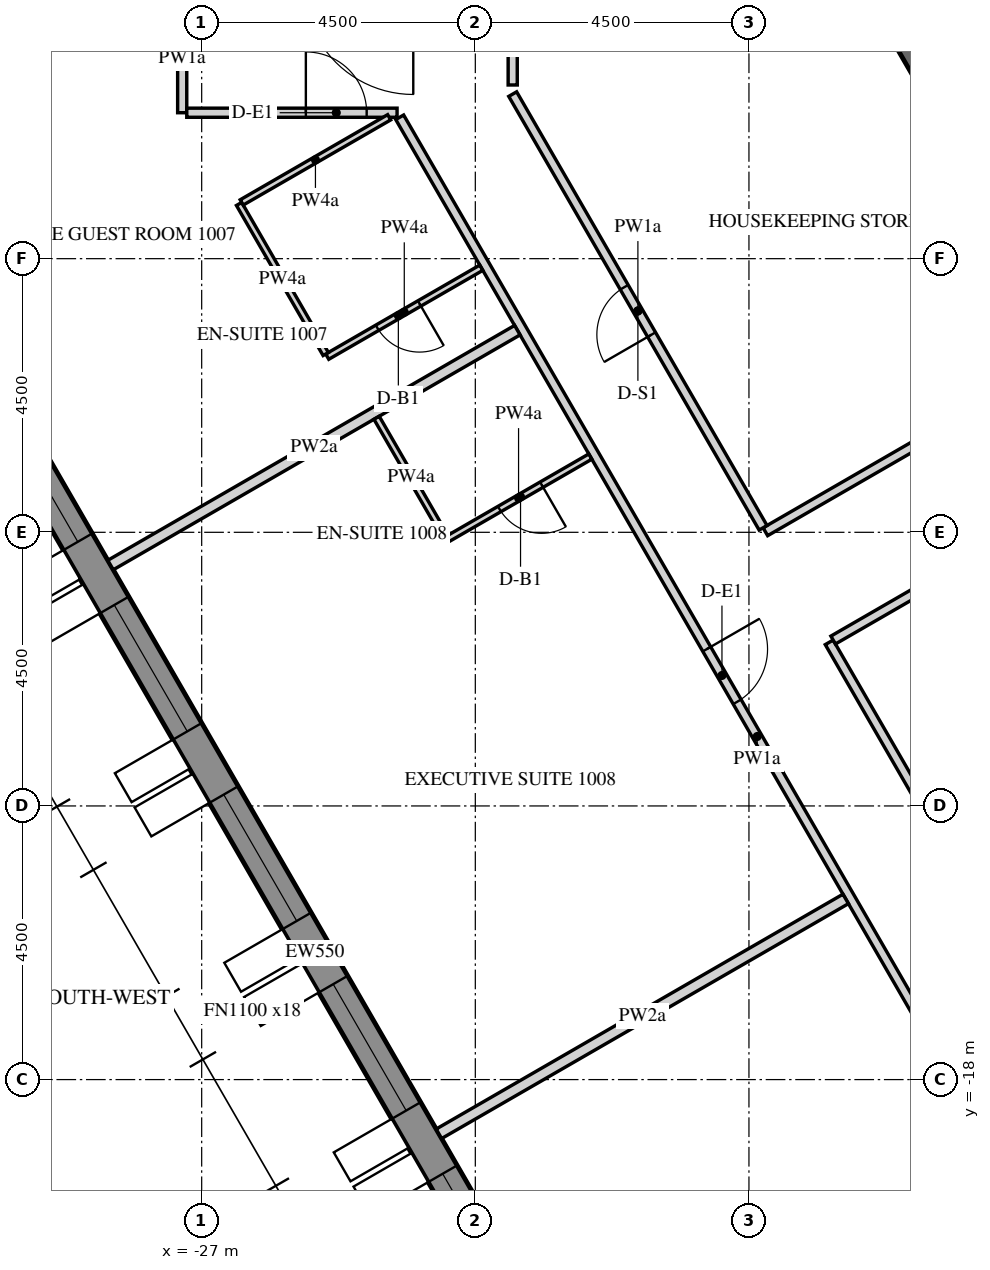
"""IFC4 building model, lengths in metres.
Left out: names, types, materials, properties, quantities, classifications, styles, units other than length and angle.
Written with IfcOpenShell. Run it as: python <this file> out.ifc"""

import sys

from ifc_helpers import new_model, si_unit, direction, frame, frame_2d, origin, place, context, subcontext, project, spatial, polyline, rectangle, outline, extrude, element, fill, save


model = new_model("IFC4")
c1 = context("Model", 3, precision=1e-05, world=origin(), true_north=direction((0.0, 1.0)))
c2 = subcontext(c1, "Body", "Model", "MODEL_VIEW")
j1 = project(units=[si_unit("LENGTHUNIT", "METRE"), si_unit("PLANEANGLEUNIT", "RADIAN")], contexts=[c1])
p1 = place(None, origin())
s1 = spatial("IfcSite", under=j1, at=p1, CompositionType="ELEMENT")
p2 = place(p1, origin())
s2 = spatial("IfcBuilding", under=s1, at=p2, CompositionType="ELEMENT")
p3 = place(p2, frame((0.0, 0.0, 135.0)))
s3 = spatial("IfcBuildingStorey", under=s2, at=p3, CompositionType="ELEMENT", Elevation=135.0)
p4 = place(p3, frame((-32.655, -2.89, -0.15), z_axis=(0.0, 0.0, 1.0), x_axis=(0.499997711317, -0.866026725152, 0.0)))
e1 = element("IfcWall", 1, at=p4, inside=s3, PredefinedType="SOLIDWALL", context=c2, shape_type="SweptSolid", body=[
    extrude(outline(polyline([(-0.022, -0.275), (30.097, -0.275), (30.045, 0.275), (0.022, 0.275), (-0.022, -0.275)])), origin(), (0.0, 0.0, 1.0), 3.9),
])
p5 = place(p4, frame((1.236, 0.0, 1.05)))
e2 = element("IfcOpeningElement", 2, at=p5, cuts=e1, PredefinedType="OPENING", context=c2, shape_type="SweptSolid", body=[
    extrude(rectangle(XDim=2.4, YDim=2.4, at=frame_2d((1.2, 1.2))), frame((0.0, 0.285, 0.0), z_axis=(0.0, -1.0, 0.0), x_axis=(1.0, 0.0, 0.0)), (0.0, 0.0, 1.0), 0.57),
])
p6 = place(p4, frame((4.835, 0.0, 1.05)))
e3 = element("IfcOpeningElement", 3, at=p6, cuts=e1, PredefinedType="OPENING", context=c2, shape_type="SweptSolid", body=[
    extrude(rectangle(XDim=2.4, YDim=2.4, at=frame_2d((1.2, 1.2))), frame((0.0, 0.285, 0.0), z_axis=(0.0, -1.0, 0.0), x_axis=(1.0, 0.0, 0.0)), (0.0, 0.0, 1.0), 0.57),
])
p7 = place(p4, frame((8.436, 0.0, 1.05)))
e4 = element("IfcOpeningElement", 4, at=p7, cuts=e1, PredefinedType="OPENING", context=c2, shape_type="SweptSolid", body=[
    extrude(rectangle(XDim=2.4, YDim=2.4, at=frame_2d((1.2, 1.2))), frame((0.0, 0.285, 0.0), z_axis=(0.0, -1.0, 0.0), x_axis=(1.0, 0.0, 0.0)), (0.0, 0.0, 1.0), 0.57),
])
p8 = place(p4, frame((12.035, 0.0, 1.05)))
e5 = element("IfcOpeningElement", 5, at=p8, cuts=e1, PredefinedType="OPENING", context=c2, shape_type="SweptSolid", body=[
    extrude(rectangle(XDim=2.4, YDim=2.4, at=frame_2d((1.2, 1.2))), frame((0.0, 0.285, 0.0), z_axis=(0.0, -1.0, 0.0), x_axis=(1.0, 0.0, 0.0)), (0.0, 0.0, 1.0), 0.57),
])
p9 = place(p4, frame((15.635, 0.0, 1.05)))
e6 = element("IfcOpeningElement", 6, at=p9, cuts=e1, PredefinedType="OPENING", context=c2, shape_type="SweptSolid", body=[
    extrude(rectangle(XDim=2.4, YDim=2.4, at=frame_2d((1.2, 1.2))), frame((0.0, 0.285, 0.0), z_axis=(0.0, -1.0, 0.0), x_axis=(1.0, 0.0, 0.0)), (0.0, 0.0, 1.0), 0.57),
])
p10 = place(p4, frame((19.236, 0.0, 1.05)))
e7 = element("IfcOpeningElement", 7, at=p10, cuts=e1, PredefinedType="OPENING", context=c2, shape_type="SweptSolid", body=[
    extrude(rectangle(XDim=2.4, YDim=2.4, at=frame_2d((1.2, 1.2))), frame((0.0, 0.285, 0.0), z_axis=(0.0, -1.0, 0.0), x_axis=(1.0, 0.0, 0.0)), (0.0, 0.0, 1.0), 0.57),
])
p11 = place(p4, frame((22.835, 0.0, 1.05)))
e8 = element("IfcOpeningElement", 8, at=p11, cuts=e1, PredefinedType="OPENING", context=c2, shape_type="SweptSolid", body=[
    extrude(rectangle(XDim=2.4, YDim=2.4, at=frame_2d((1.2, 1.2))), frame((0.0, 0.285, 0.0), z_axis=(0.0, -1.0, 0.0), x_axis=(1.0, 0.0, 0.0)), (0.0, 0.0, 1.0), 0.57),
])
p12 = place(p4, frame((26.436, 0.0, 1.05)))
e9 = element("IfcOpeningElement", 9, at=p12, cuts=e1, PredefinedType="OPENING", context=c2, shape_type="SweptSolid", body=[
    extrude(rectangle(XDim=2.4, YDim=2.4, at=frame_2d((1.2, 1.2))), frame((0.0, 0.285, 0.0), z_axis=(0.0, -1.0, 0.0), x_axis=(1.0, 0.0, 0.0)), (0.0, 0.0, 1.0), 0.57),
])
p13 = place(p3, frame((-15.819, 0.0, -0.15), z_axis=(0.0, 0.0, 1.0), x_axis=(0.499999880136, -0.866025472988, 0.0)))
e10 = element("IfcWall", 10, at=p13, inside=s3, PredefinedType="SHEAR", context=c2, shape_type="SweptSolid", body=[
    extrude(outline(polyline([(-0.173, -0.3), (15.993, -0.3), (15.646, 0.3), (0.173, 0.3), (-0.173, -0.3)])), origin(), (0.0, 0.0, 1.0), 3.9),
])
p14 = place(p13, frame((6.981, 0.0, 0.15)))
e11 = element("IfcOpeningElement", 11, at=p14, cuts=e10, PredefinedType="OPENING", context=c2, shape_type="SweptSolid", body=[
    extrude(rectangle(XDim=1.8, YDim=2.4, at=frame_2d((0.9, 1.2))), frame((0.0, 0.31, 0.0), z_axis=(0.0, -1.0, 0.0), x_axis=(1.0, 0.0, 0.0)), (0.0, 0.0, 1.0), 0.62),
])
p15 = place(p3, frame((-27.32, -0.3, 0.0), z_axis=(0.0, 0.0, 1.0), x_axis=(0.0, -1.0, 0.0)))
e12 = element("IfcWall", 12, at=p15, inside=s3, PredefinedType="PARTITIONING", context=c2, shape_type="SweptSolid", body=[
    extrude(rectangle(XDim=1.8, YDim=0.15, at=frame_2d((0.9, 0.0))), origin(), (0.0, 0.0, 1.0), 2.838),
])
p16 = place(p3, frame((-27.245, -2.1, 0.0), z_axis=(0.0, 0.0, 1.0), x_axis=(1.0, 0.0, 0.0)))
e13 = element("IfcWall", 13, at=p16, inside=s3, PredefinedType="PARTITIONING", context=c2, shape_type="SweptSolid", body=[
    extrude(rectangle(XDim=3.458, YDim=0.15, at=frame_2d((1.729, 0.0))), origin(), (0.0, 0.0, 1.0), 2.838),
])
p17 = place(p16, frame((1.958, 0.0, 0.0)))
e14 = element("IfcOpeningElement", 14, at=p17, cuts=e13, PredefinedType="OPENING", context=c2, shape_type="SweptSolid", body=[
    extrude(rectangle(XDim=1.0, YDim=2.1, at=frame_2d((0.5, 1.05))), frame((0.0, 0.085, 0.0), z_axis=(0.0, -1.0, 0.0), x_axis=(1.0, 0.0, 0.0)), (0.0, 0.0, 1.0), 0.17),
])
p18 = place(p3, frame((-23.743, -2.175, 0.0), z_axis=(0.0, 0.0, 1.0), x_axis=(0.499992353047, -0.86602981871, 0.0)))
e15 = element("IfcWall", 15, at=p18, inside=s3, PredefinedType="PARTITIONING", context=c2, shape_type="SweptSolid", body=[
    extrude(rectangle(XDim=23.516, YDim=0.15, at=frame_2d((11.758, 0.0))), origin(), (0.0, 0.0, 1.0), 2.838),
])
p19 = place(p18, frame((10.099, 0.0, 0.0)))
e16 = element("IfcOpeningElement", 16, at=p19, cuts=e15, PredefinedType="OPENING", context=c2, shape_type="SweptSolid", body=[
    extrude(rectangle(XDim=1.0, YDim=2.1, at=frame_2d((0.5, 1.05))), frame((0.0, 0.085, 0.0), z_axis=(0.0, -1.0, 0.0), x_axis=(1.0, 0.0, 0.0)), (0.0, 0.0, 1.0), 0.17),
])
p20 = place(p18, frame((17.358, 0.0, 0.0)))
e17 = element("IfcOpeningElement", 17, at=p20, cuts=e15, PredefinedType="OPENING", context=c2, shape_type="SweptSolid", body=[
    extrude(rectangle(XDim=1.0, YDim=2.1, at=frame_2d((0.5, 1.05))), frame((0.0, 0.085, 0.0), z_axis=(0.0, -1.0, 0.0), x_axis=(1.0, 0.0, 0.0)), (0.0, 0.0, 1.0), 0.17),
])
p21 = place(p3, frame((-12.664, -6.066, 0.0), z_axis=(0.0, 0.0, 1.0), x_axis=(-0.866018092707, -0.500012662943, 0.0)))
e18 = element("IfcWall", 18, at=p21, inside=s3, PredefinedType="PARTITIONING", context=c2, shape_type="SweptSolid", body=[
    extrude(rectangle(XDim=5.85, YDim=0.15, at=frame_2d((2.925, 0.0))), origin(), (0.0, 0.0, 1.0), 2.838),
])
p22 = place(p3, frame((-17.768, -8.926, 0.0), z_axis=(0.0, 0.0, 1.0), x_axis=(-0.499997033681, 0.866027116383, 0.0)))
e19 = element("IfcWall", 19, at=p22, inside=s3, PredefinedType="PARTITIONING", context=c2, shape_type="SweptSolid", body=[
    extrude(rectangle(XDim=8.235, YDim=0.15, at=frame_2d((4.118, 0.0))), origin(), (0.0, 0.0, 1.0), 2.838),
])
p23 = place(p22, frame((3.668, 0.0, 0.0)))
e20 = element("IfcOpeningElement", 20, at=p23, cuts=e19, PredefinedType="OPENING", context=c2, shape_type="SweptSolid", body=[
    extrude(rectangle(XDim=0.9, YDim=2.1, at=frame_2d((0.45, 1.05))), frame((0.0, 0.085, 0.0), z_axis=(0.0, -1.0, 0.0), x_axis=(1.0, 0.0, 0.0)), (0.0, 0.0, 1.0), 0.17),
])
p24 = place(p3, frame((-21.885, -1.644, 0.0), z_axis=(0.0, 0.0, 1.0), x_axis=(0.0, 1.0, 0.0)))
e21 = element("IfcWall", 21, at=p24, inside=s3, PredefinedType="PARTITIONING", context=c2, shape_type="SweptSolid", body=[
    extrude(rectangle(XDim=1.344, YDim=0.15, at=frame_2d((0.672, 0.0))), origin(), (0.0, 0.0, 1.0), 2.838),
])
p25 = place(p3, frame((-11.031, -20.595, 0.0), z_axis=(0.0, 0.0, 1.0), x_axis=(-0.499987422378, 0.866032665356, 0.0)))
e22 = element("IfcWall", 22, at=p25, inside=s3, PredefinedType="PARTITIONING", context=c2, shape_type="SweptSolid", body=[
    extrude(rectangle(XDim=11.299, YDim=0.15, at=frame_2d((5.649, 0.0))), origin(), (0.0, 0.0, 1.0), 2.838),
])
p26 = place(p25, frame((5.199, 0.0, 0.0)))
e23 = element("IfcOpeningElement", 23, at=p26, cuts=e22, PredefinedType="OPENING", context=c2, shape_type="SweptSolid", body=[
    extrude(rectangle(XDim=0.9, YDim=2.1, at=frame_2d((0.45, 1.05))), frame((0.0, 0.085, 0.0), z_axis=(0.0, -1.0, 0.0), x_axis=(1.0, 0.0, 0.0)), (0.0, 0.0, 1.0), 0.17),
])
p27 = place(p3, frame((-16.615, -10.772, 0.0), z_axis=(0.0, 0.0, 1.0), x_axis=(0.866025774745, 0.499999357477, 0.0)))
e24 = element("IfcWall", 24, at=p27, inside=s3, PredefinedType="PARTITIONING", context=c2, shape_type="SweptSolid", body=[
    extrude(rectangle(XDim=5.775, YDim=0.15, at=frame_2d((2.887, 0.0))), origin(), (0.0, 0.0, 1.0), 2.838),
])
p28 = place(p3, frame((-22.402, -4.649, 0.0), z_axis=(0.0, 0.0, 1.0), x_axis=(-0.865989585315, -0.500062034277, 0.0)))
e25 = element("IfcWall", 25, at=p28, inside=s3, PredefinedType="PARTITIONING", context=c2, shape_type="SweptSolid", body=[
    extrude(rectangle(XDim=2.925, YDim=0.1, at=frame_2d((1.462, 0.0))), origin(), (0.0, 0.0, 1.0), 2.838),
])
p29 = place(p28, frame((1.175, 0.0, 0.0)))
e26 = element("IfcOpeningElement", 26, at=p29, cuts=e25, PredefinedType="OPENING", context=c2, shape_type="SweptSolid", body=[
    extrude(rectangle(XDim=0.8, YDim=2.1, at=frame_2d((0.4, 1.05))), frame((0.0, 0.06, 0.0), z_axis=(0.0, -1.0, 0.0), x_axis=(1.0, 0.0, 0.0)), (0.0, 0.0, 1.0), 0.12),
])
p30 = place(p3, frame((-24.96, -6.068, 0.0), z_axis=(0.0, 0.0, 1.0), x_axis=(-0.500036373335, 0.866004402611, 0.0)))
e27 = element("IfcWall", 27, at=p30, inside=s3, PredefinedType="PARTITIONING", context=c2, shape_type="SweptSolid", body=[
    extrude(rectangle(XDim=2.85, YDim=0.1, at=frame_2d((1.425, 0.0))), origin(), (0.0, 0.0, 1.0), 2.838),
])
p31 = place(p3, frame((-26.342, -3.575, 0.0), z_axis=(0.0, 0.0, 1.0), x_axis=(0.866034573852, 0.49998411664, 0.0)))
e28 = element("IfcWall", 28, at=p31, inside=s3, PredefinedType="PARTITIONING", context=c2, shape_type="SweptSolid", body=[
    extrude(rectangle(XDim=2.8, YDim=0.1, at=frame_2d((1.4, 0.0))), origin(), (0.0, 0.0, 1.0), 2.838),
])
p32 = place(p3, frame((-28.499, -9.538, 0.0), z_axis=(0.0, 0.0, 1.0), x_axis=(0.866040859435, 0.499973229072, 0.0)))
e29 = element("IfcWall", 29, at=p32, inside=s3, PredefinedType="PARTITIONING", context=c2, shape_type="SweptSolid", body=[
    extrude(rectangle(XDim=7.725, YDim=0.18, at=frame_2d((3.863, 0.0))), origin(), (0.0, 0.0, 1.0), 2.838),
])
p33 = place(p3, frame((-20.609, -7.754, 0.0), z_axis=(0.0, 0.0, 1.0), x_axis=(-0.866012511928, -0.500022328685, 0.0)))
e30 = element("IfcWall", 30, at=p33, inside=s3, PredefinedType="PARTITIONING", context=c2, shape_type="SweptSolid", body=[
    extrude(rectangle(XDim=2.725, YDim=0.1, at=frame_2d((1.363, 0.0))), origin(), (0.0, 0.0, 1.0), 2.838),
])
p34 = place(p33, frame((0.925, 0.0, 0.0)))
e31 = element("IfcOpeningElement", 31, at=p34, cuts=e30, PredefinedType="OPENING", context=c2, shape_type="SweptSolid", body=[
    extrude(rectangle(XDim=0.8, YDim=2.1, at=frame_2d((0.4, 1.05))), frame((0.0, 0.06, 0.0), z_axis=(0.0, -1.0, 0.0), x_axis=(1.0, 0.0, 0.0)), (0.0, 0.0, 1.0), 0.12),
])
p35 = place(p3, frame((-22.994, -9.073, 0.0), z_axis=(0.0, 0.0, 1.0), x_axis=(-0.4999967785, 0.866027263711, 0.0)))
e32 = element("IfcWall", 32, at=p35, inside=s3, PredefinedType="PARTITIONING", context=c2, shape_type="SweptSolid", body=[
    extrude(rectangle(XDim=2.26, YDim=0.1, at=frame_2d((1.13, 0.0))), origin(), (0.0, 0.0, 1.0), 2.838),
])
p36 = place(p3, frame((-23.099, -18.892, 0.0), z_axis=(0.0, 0.0, 1.0), x_axis=(0.866019273868, 0.500010617176, 0.0)))
e33 = element("IfcWall", 33, at=p36, inside=s3, PredefinedType="PARTITIONING", context=c2, shape_type="SweptSolid", body=[
    extrude(rectangle(XDim=7.725, YDim=0.18, at=frame_2d((3.862, 0.0))), origin(), (0.0, 0.0, 1.0), 2.838),
])
p37 = place(p6, frame((0.0, 0.205, 0.0)))
e34 = element("IfcWindow", 34, at=p37, inside=s3, PartitioningType="DOUBLE_PANEL_VERTICAL", PredefinedType="WINDOW", context=c2, shape_type="SweptSolid", body=[
    extrude(rectangle(XDim=2.4, YDim=2.4, at=frame_2d((1.2, 1.2))), frame((0.0, 0.03, 0.0), z_axis=(0.0, -1.0, 0.0), x_axis=(1.0, 0.0, 0.0)), (0.0, 0.0, 1.0), 0.06),
])
fill(e3, e34)
p38 = place(p7, frame((0.0, 0.205, 0.0)))
e35 = element("IfcWindow", 35, at=p38, inside=s3, PartitioningType="DOUBLE_PANEL_VERTICAL", PredefinedType="WINDOW", context=c2, shape_type="SweptSolid", body=[
    extrude(rectangle(XDim=2.4, YDim=2.4, at=frame_2d((1.2, 1.2))), frame((0.0, 0.03, 0.0), z_axis=(0.0, -1.0, 0.0), x_axis=(1.0, 0.0, 0.0)), (0.0, 0.0, 1.0), 0.06),
])
fill(e4, e35)
p39 = place(p8, frame((0.0, 0.205, 0.0)))
e36 = element("IfcWindow", 36, at=p39, inside=s3, PartitioningType="DOUBLE_PANEL_VERTICAL", PredefinedType="WINDOW", context=c2, shape_type="SweptSolid", body=[
    extrude(rectangle(XDim=2.4, YDim=2.4, at=frame_2d((1.2, 1.2))), frame((0.0, 0.03, 0.0), z_axis=(0.0, -1.0, 0.0), x_axis=(1.0, 0.0, 0.0)), (0.0, 0.0, 1.0), 0.06),
])
fill(e5, e36)
p40 = place(p9, frame((0.0, 0.205, 0.0)))
e37 = element("IfcWindow", 37, at=p40, inside=s3, PartitioningType="DOUBLE_PANEL_VERTICAL", PredefinedType="WINDOW", context=c2, shape_type="SweptSolid", body=[
    extrude(rectangle(XDim=2.4, YDim=2.4, at=frame_2d((1.2, 1.2))), frame((0.0, 0.03, 0.0), z_axis=(0.0, -1.0, 0.0), x_axis=(1.0, 0.0, 0.0)), (0.0, 0.0, 1.0), 0.06),
])
fill(e6, e37)
p41 = place(p10, frame((0.0, 0.205, 0.0)))
e38 = element("IfcWindow", 38, at=p41, inside=s3, PartitioningType="DOUBLE_PANEL_VERTICAL", PredefinedType="WINDOW", context=c2, shape_type="SweptSolid", body=[
    extrude(rectangle(XDim=2.4, YDim=2.4, at=frame_2d((1.2, 1.2))), frame((0.0, 0.03, 0.0), z_axis=(0.0, -1.0, 0.0), x_axis=(1.0, 0.0, 0.0)), (0.0, 0.0, 1.0), 0.06),
])
fill(e7, e38)
p42 = place(p17, origin())
e39 = element("IfcDoor", 39, at=p42, inside=s3, OperationType="SINGLE_SWING_LEFT", PredefinedType="DOOR", context=c2, shape_type="SweptSolid", body=[
    extrude(rectangle(XDim=1.0, YDim=2.1, at=frame_2d((0.5, 1.05))), frame((0.0, 0.025, 0.0), z_axis=(0.0, -1.0, 0.0), x_axis=(1.0, 0.0, 0.0)), (0.0, 0.0, 1.0), 0.05),
])
fill(e14, e39)
p43 = place(p29, origin())
e40 = element("IfcDoor", 40, at=p43, inside=s3, OperationType="SINGLE_SWING_LEFT", PredefinedType="DOOR", context=c2, shape_type="SweptSolid", body=[
    extrude(rectangle(XDim=0.8, YDim=2.1, at=frame_2d((0.4, 1.05))), frame((0.0, 0.025, 0.0), z_axis=(0.0, -1.0, 0.0), x_axis=(1.0, 0.0, 0.0)), (0.0, 0.0, 1.0), 0.05),
])
fill(e26, e40)
p44 = place(p19, origin())
e41 = element("IfcDoor", 41, at=p44, inside=s3, OperationType="SINGLE_SWING_LEFT", PredefinedType="DOOR", context=c2, shape_type="SweptSolid", body=[
    extrude(rectangle(XDim=1.0, YDim=2.1, at=frame_2d((0.5, 1.05))), frame((0.0, 0.025, 0.0), z_axis=(0.0, -1.0, 0.0), x_axis=(1.0, 0.0, 0.0)), (0.0, 0.0, 1.0), 0.05),
])
fill(e16, e41)
p45 = place(p34, origin())
e42 = element("IfcDoor", 42, at=p45, inside=s3, OperationType="SINGLE_SWING_RIGHT", PredefinedType="DOOR", context=c2, shape_type="SweptSolid", body=[
    extrude(rectangle(XDim=0.8, YDim=2.1, at=frame_2d((0.4, 1.05))), frame((0.0, 0.025, 0.0), z_axis=(0.0, -1.0, 0.0), x_axis=(1.0, 0.0, 0.0)), (0.0, 0.0, 1.0), 0.05),
])
fill(e31, e42)
p46 = place(p23, origin())
e43 = element("IfcDoor", 43, at=p46, inside=s3, OperationType="SINGLE_SWING_RIGHT", PredefinedType="DOOR", context=c2, shape_type="SweptSolid", body=[
    extrude(rectangle(XDim=0.9, YDim=2.1, at=frame_2d((0.45, 1.05))), frame((0.0, 0.025, 0.0), z_axis=(0.0, -1.0, 0.0), x_axis=(1.0, 0.0, 0.0)), (0.0, 0.0, 1.0), 0.05),
])
fill(e20, e43)
save(model, sys.argv[1])
